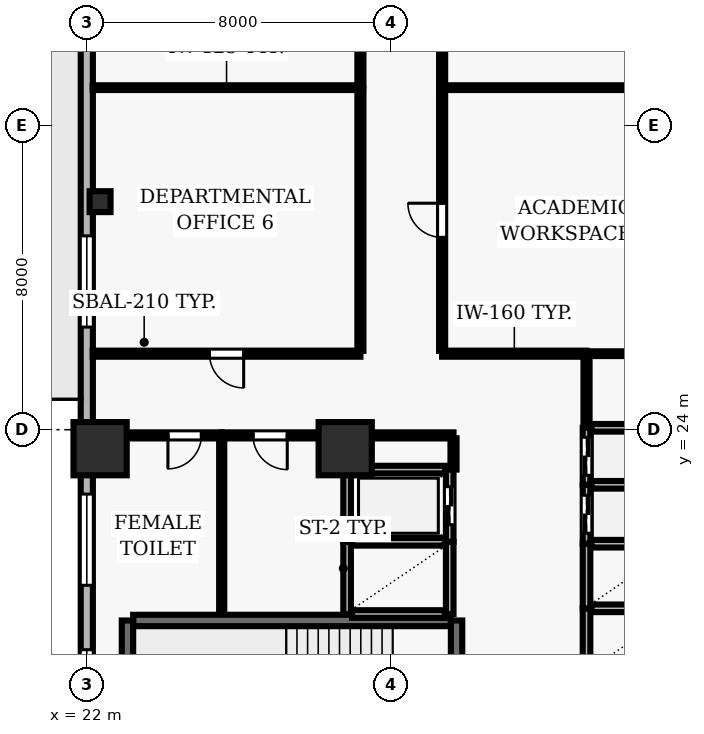
"""IFC4 building model, lengths in metres.
Left out: names, types, materials, properties, quantities, classifications, styles, units other than length and angle.
Written with IfcOpenShell. Run it as: python <this file> out.ifc"""

import sys

from ifc_helpers import new_model, si_unit, direction, frame, frame_2d, origin, origin_2d, place, context, subcontext, project, spatial, rectangle, hollow_rectangle, extrude, element, fill, save


model = new_model("IFC4")
c1 = context("Model", 3, precision=1e-05, world=origin(), true_north=direction((0.0, 1.0)))
c2 = subcontext(c1, "Body", "Model", "MODEL_VIEW")
j1 = project(units=[si_unit("LENGTHUNIT", "METRE"), si_unit("PLANEANGLEUNIT", "RADIAN")], contexts=[c1])
p1 = place(None, origin())
s1 = spatial("IfcSite", under=j1, at=p1, CompositionType="ELEMENT")
p2 = place(p1, origin())
s2 = spatial("IfcBuilding", under=s1, at=p2, CompositionType="ELEMENT")
p3 = place(p2, frame((0.0, 0.0, 46.6)))
s3 = spatial("IfcBuildingStorey", under=s2, at=p3, CompositionType="ELEMENT", Elevation=46.6)
for number, where, z_axis, x_axis in (
    (1, (22.35, 23.5, 0.0), (0.0, 0.0, 1.0), (1.0, 0.0, 0.0)),
    (2, (28.8, 23.5, 0.0), (0.0, 0.0, 1.0), (1.0, 0.0, 0.0)),
):
    element("IfcColumn", number, at=place(p3, frame(where, z_axis=z_axis, x_axis=x_axis)), inside=s3, PredefinedType="COLUMN", context=c2, shape_type="SweptSolid", body=[
        extrude(rectangle(XDim=1.4, YDim=1.4, at=origin_2d()), origin(), (0.0, 0.0, 1.0), 3.9),
    ])
p4 = place(p3, frame((22.35, 30.0, 0.0), z_axis=(0.0, 0.0, 1.0), x_axis=(1.0, 0.0, 0.0)))
e3 = element("IfcColumn", 3, at=p4, inside=s3, PredefinedType="COLUMN", context=c2, shape_type="SweptSolid", body=[
    extrude(hollow_rectangle(XDim=0.55, YDim=0.55, WallThickness=0.025, at=origin_2d()), origin(), (0.0, 0.0, 1.0), 3.9),
])
p5 = place(p3, frame((22.0, 51.5, 0.0), z_axis=(0.0, 0.0, 1.0), x_axis=(0.0, -1.0, 0.0)))
e4 = element("IfcWall", 4, at=p5, inside=s3, PredefinedType="SOLIDWALL", context=c2, shape_type="SweptSolid", body=[
    extrude(rectangle(XDim=49.0, YDim=0.32, at=frame_2d((24.5, 0.0))), origin(), (0.0, 0.0, 1.0), 3.69),
])
p6 = place(p5, frame((12.1, 0.0, 0.0)))
e5 = element("IfcOpeningElement", 5, at=p6, cuts=e4, PredefinedType="OPENING", context=c2, shape_type="SweptSolid", body=[
    extrude(rectangle(XDim=1.0, YDim=2.2, at=frame_2d((0.5, 1.1))), frame((0.0, 0.17, 0.0), z_axis=(0.0, -1.0, 0.0), x_axis=(1.0, 0.0, 0.0)), (0.0, 0.0, 1.0), 0.34),
])
p7 = place(p5, frame((1.522, 0.0, 0.9)))
e6 = element("IfcOpeningElement", 6, at=p7, cuts=e4, PredefinedType="OPENING", context=c2, shape_type="SweptSolid", body=[
    extrude(rectangle(XDim=2.4, YDim=2.2, at=frame_2d((1.2, 1.1))), frame((0.0, 0.17, 0.0), z_axis=(0.0, -1.0, 0.0), x_axis=(1.0, 0.0, 0.0)), (0.0, 0.0, 1.0), 0.34),
])
p8 = place(p5, frame((6.967, 0.0, 0.9)))
e7 = element("IfcOpeningElement", 7, at=p8, cuts=e4, PredefinedType="OPENING", context=c2, shape_type="SweptSolid", body=[
    extrude(rectangle(XDim=2.4, YDim=2.2, at=frame_2d((1.2, 1.1))), frame((0.0, 0.17, 0.0), z_axis=(0.0, -1.0, 0.0), x_axis=(1.0, 0.0, 0.0)), (0.0, 0.0, 1.0), 0.34),
])
p9 = place(p5, frame((22.4, 0.0, 0.9)))
e8 = element("IfcOpeningElement", 8, at=p9, cuts=e4, PredefinedType="OPENING", context=c2, shape_type="SweptSolid", body=[
    extrude(rectangle(XDim=2.4, YDim=2.2, at=frame_2d((1.2, 1.1))), frame((0.0, 0.17, 0.0), z_axis=(0.0, -1.0, 0.0), x_axis=(1.0, 0.0, 0.0)), (0.0, 0.0, 1.0), 0.34),
])
p10 = place(p5, frame((29.194, 0.0, 0.9)))
e9 = element("IfcOpeningElement", 9, at=p10, cuts=e4, PredefinedType="OPENING", context=c2, shape_type="SweptSolid", body=[
    extrude(rectangle(XDim=2.4, YDim=2.2, at=frame_2d((1.2, 1.1))), frame((0.0, 0.17, 0.0), z_axis=(0.0, -1.0, 0.0), x_axis=(1.0, 0.0, 0.0)), (0.0, 0.0, 1.0), 0.34),
])
p11 = place(p5, frame((33.289, 0.0, 0.9)))
e10 = element("IfcOpeningElement", 10, at=p11, cuts=e4, PredefinedType="OPENING", context=c2, shape_type="SweptSolid", body=[
    extrude(rectangle(XDim=2.4, YDim=2.2, at=frame_2d((1.2, 1.1))), frame((0.0, 0.17, 0.0), z_axis=(0.0, -1.0, 0.0), x_axis=(1.0, 0.0, 0.0)), (0.0, 0.0, 1.0), 0.34),
])
p12 = place(p5, frame((39.633, 0.0, 0.9)))
e11 = element("IfcOpeningElement", 11, at=p12, cuts=e4, PredefinedType="OPENING", context=c2, shape_type="SweptSolid", body=[
    extrude(rectangle(XDim=2.4, YDim=2.2, at=frame_2d((1.2, 1.1))), frame((0.0, 0.17, 0.0), z_axis=(0.0, -1.0, 0.0), x_axis=(1.0, 0.0, 0.0)), (0.0, 0.0, 1.0), 0.34),
])
p13 = place(p3, frame((31.58, 18.98, 0.0), z_axis=(0.0, 0.0, 1.0), x_axis=(-1.0, 0.0, 0.0)))
e12 = element("IfcWall", 12, at=p13, inside=s3, PredefinedType="SHEAR", context=c2, shape_type="SweptSolid", body=[
    extrude(rectangle(XDim=8.36, YDim=0.3, at=frame_2d((4.18, 0.0))), origin(), (0.0, 0.0, 1.0), 3.69),
])
p14 = place(p3, frame((23.07, 18.98, 0.0), z_axis=(0.0, 0.0, 1.0), x_axis=(0.0, -1.0, 0.0)))
e13 = element("IfcWall", 13, at=p14, inside=s3, PredefinedType="SHEAR", context=c2, shape_type="SweptSolid", body=[
    extrude(rectangle(XDim=3.51, YDim=0.3, at=frame_2d((1.755, 0.0))), origin(), (0.0, 0.0, 1.0), 3.69),
])
p15 = place(p3, frame((31.73, 15.47, 0.0), z_axis=(0.0, 0.0, 1.0), x_axis=(0.0, 1.0, 0.0)))
e14 = element("IfcWall", 14, at=p15, inside=s3, PredefinedType="SHEAR", context=c2, shape_type="SweptSolid", body=[
    extrude(rectangle(XDim=3.51, YDim=0.3, at=frame_2d((1.755, 0.0))), origin(), (0.0, 0.0, 1.0), 3.69),
])
p16 = place(p15, frame((1.18, 0.0, 0.0)))
e15 = element("IfcOpeningElement", 15, at=p16, cuts=e14, PredefinedType="OPENING", context=c2, shape_type="SweptSolid", body=[
    extrude(rectangle(XDim=1.15, YDim=2.15, at=frame_2d((0.575, 1.075))), frame((0.0, 0.16, 0.0), z_axis=(0.0, -1.0, 0.0), x_axis=(1.0, 0.0, 0.0)), (0.0, 0.0, 1.0), 0.32),
])
p17 = place(p3, frame((35.15, 19.3, 0.0), z_axis=(0.0, 0.0, 1.0), x_axis=(0.0, -1.0, 0.0)))
e16 = element("IfcWall", 16, at=p17, inside=s3, PredefinedType="SOLIDWALL", context=c2, shape_type="SweptSolid", body=[
    extrude(rectangle(XDim=1.7, YDim=0.2, at=frame_2d((0.85, 0.0))), origin(), (0.0, 0.0, 1.0), 3.69),
])
p18 = place(p3, frame((37.42, 19.3, 0.0), z_axis=(0.0, 0.0, 1.0), x_axis=(-1.0, 0.0, 0.0)))
e17 = element("IfcWall", 17, at=p18, inside=s3, PredefinedType="SOLIDWALL", context=c2, shape_type="SweptSolid", body=[
    extrude(rectangle(XDim=2.14, YDim=0.2, at=frame_2d((1.07, 0.0))), origin(), (0.0, 0.0, 1.0), 3.69),
])
p19 = place(p3, frame((35.15, 21.0, 0.0), z_axis=(0.0, 0.0, 1.0), x_axis=(0.0, -1.0, 0.0)))
e18 = element("IfcWall", 18, at=p19, inside=s3, PredefinedType="SOLIDWALL", context=c2, shape_type="SweptSolid", body=[
    extrude(rectangle(XDim=1.7, YDim=0.2, at=frame_2d((0.85, 0.0))), origin(), (0.0, 0.0, 1.0), 3.69),
])
p20 = place(p3, frame((37.42, 21.0, 0.0), z_axis=(0.0, 0.0, 1.0), x_axis=(-1.0, 0.0, 0.0)))
e19 = element("IfcWall", 19, at=p20, inside=s3, PredefinedType="SOLIDWALL", context=c2, shape_type="SweptSolid", body=[
    extrude(rectangle(XDim=2.14, YDim=0.2, at=frame_2d((1.07, 0.0))), origin(), (0.0, 0.0, 1.0), 3.69),
])
for number, where, z_axis, x_axis in (
    (20, (28.85, 21.05, 0.0), (0.0, 0.0, 1.0), (0.0, -1.0, 0.0)),
    (21, (31.55, 19.15, 0.0), (0.0, 0.0, 1.0), (0.0, 1.0, 0.0)),
):
    element("IfcWall", number, at=place(p3, frame(where, z_axis=z_axis, x_axis=x_axis)), inside=s3, PredefinedType="SOLIDWALL", context=c2, shape_type="SweptSolid", body=[
        extrude(rectangle(XDim=1.9, YDim=0.2, at=frame_2d((0.95, 0.0))), origin(), (0.0, 0.0, 1.0), 3.69),
    ])
for number, where, z_axis, x_axis in (
    (22, (28.98, 19.15, 0.0), (0.0, 0.0, 1.0), (1.0, 0.0, 0.0)),
    (23, (31.42, 21.05, 0.0), (0.0, 0.0, 1.0), (-1.0, 0.0, 0.0)),
):
    element("IfcWall", number, at=place(p3, frame(where, z_axis=z_axis, x_axis=x_axis)), inside=s3, PredefinedType="SOLIDWALL", context=c2, shape_type="SweptSolid", body=[
        extrude(rectangle(XDim=2.44, YDim=0.2, at=frame_2d((1.22, 0.0))), origin(), (0.0, 0.0, 1.0), 3.69),
    ])
p21 = place(p3, frame((35.15, 22.55, 0.0), z_axis=(0.0, 0.0, 1.0), x_axis=(0.0, -1.0, 0.0)))
e24 = element("IfcWall", 24, at=p21, inside=s3, PredefinedType="SOLIDWALL", context=c2, shape_type="SweptSolid", body=[
    extrude(rectangle(XDim=1.55, YDim=0.2, at=frame_2d((0.775, 0.0))), origin(), (0.0, 0.0, 1.0), 3.69),
])
p22 = place(p21, frame((0.275, 0.0, 0.0)))
e25 = element("IfcOpeningElement", 25, at=p22, cuts=e24, PredefinedType="OPENING", context=c2, shape_type="SweptSolid", body=[
    extrude(rectangle(XDim=1.0, YDim=2.1, at=frame_2d((0.5, 1.05))), frame((0.0, 0.11, 0.0), z_axis=(0.0, -1.0, 0.0), x_axis=(1.0, 0.0, 0.0)), (0.0, 0.0, 1.0), 0.22),
])
p23 = place(p3, frame((37.42, 22.55, 0.0), z_axis=(0.0, 0.0, 1.0), x_axis=(-1.0, 0.0, 0.0)))
e26 = element("IfcWall", 26, at=p23, inside=s3, PredefinedType="SOLIDWALL", context=c2, shape_type="SweptSolid", body=[
    extrude(rectangle(XDim=2.14, YDim=0.2, at=frame_2d((1.07, 0.0))), origin(), (0.0, 0.0, 1.0), 3.69),
])
p24 = place(p3, frame((35.15, 24.05, 0.0), z_axis=(0.0, 0.0, 1.0), x_axis=(0.0, -1.0, 0.0)))
e27 = element("IfcWall", 27, at=p24, inside=s3, PredefinedType="SOLIDWALL", context=c2, shape_type="SweptSolid", body=[
    extrude(rectangle(XDim=1.5, YDim=0.2, at=frame_2d((0.75, 0.0))), origin(), (0.0, 0.0, 1.0), 3.69),
])
p25 = place(p24, frame((0.25, 0.0, 0.0)))
e28 = element("IfcOpeningElement", 28, at=p25, cuts=e27, PredefinedType="OPENING", context=c2, shape_type="SweptSolid", body=[
    extrude(rectangle(XDim=1.0, YDim=2.1, at=frame_2d((0.5, 1.05))), frame((0.0, 0.11, 0.0), z_axis=(0.0, -1.0, 0.0), x_axis=(1.0, 0.0, 0.0)), (0.0, 0.0, 1.0), 0.22),
])
p26 = place(p3, frame((37.42, 24.05, 0.0), z_axis=(0.0, 0.0, 1.0), x_axis=(-1.0, 0.0, 0.0)))
e29 = element("IfcWall", 29, at=p26, inside=s3, PredefinedType="SOLIDWALL", context=c2, shape_type="SweptSolid", body=[
    extrude(rectangle(XDim=2.14, YDim=0.2, at=frame_2d((1.07, 0.0))), origin(), (0.0, 0.0, 1.0), 3.69),
])
p27 = place(p3, frame((28.85, 22.95, 0.0), z_axis=(0.0, 0.0, 1.0), x_axis=(0.0, -1.0, 0.0)))
e30 = element("IfcWall", 30, at=p27, inside=s3, PredefinedType="SOLIDWALL", context=c2, shape_type="SweptSolid", body=[
    extrude(rectangle(XDim=1.9, YDim=0.2, at=frame_2d((0.95, 0.0))), origin(), (0.0, 0.0, 1.0), 3.69),
])
p28 = place(p3, frame((31.55, 21.05, 0.0), z_axis=(0.0, 0.0, 1.0), x_axis=(0.0, 1.0, 0.0)))
e31 = element("IfcWall", 31, at=p28, inside=s3, PredefinedType="SOLIDWALL", context=c2, shape_type="SweptSolid", body=[
    extrude(rectangle(XDim=1.9, YDim=0.2, at=frame_2d((0.95, 0.0))), origin(), (0.0, 0.0, 1.0), 3.69),
])
p29 = place(p28, frame((0.45, 0.0, 0.0)))
e32 = element("IfcOpeningElement", 32, at=p29, cuts=e31, PredefinedType="OPENING", context=c2, shape_type="SweptSolid", body=[
    extrude(rectangle(XDim=1.0, YDim=2.1, at=frame_2d((0.5, 1.05))), frame((0.0, 0.11, 0.0), z_axis=(0.0, -1.0, 0.0), x_axis=(1.0, 0.0, 0.0)), (0.0, 0.0, 1.0), 0.22),
])
p30 = place(p3, frame((31.43, 22.95, 0.0), z_axis=(0.0, 0.0, 1.0), x_axis=(-1.0, 0.0, 0.0)))
e33 = element("IfcWall", 33, at=p30, inside=s3, PredefinedType="SOLIDWALL", context=c2, shape_type="SweptSolid", body=[
    extrude(rectangle(XDim=2.46, YDim=0.2, at=frame_2d((1.23, 0.0))), origin(), (0.0, 0.0, 1.0), 3.69),
])
p31 = place(p3, frame((25.55, 23.85, 0.0), z_axis=(0.0, 0.0, 1.0), x_axis=(-1.0, 0.0, 0.0)))
e34 = element("IfcWall", 34, at=p31, inside=s3, PredefinedType="PARTITIONING", context=c2, shape_type="SweptSolid", body=[
    extrude(rectangle(XDim=3.35, YDim=0.16, at=frame_2d((1.675, 0.0))), origin(), (0.0, 0.0, 1.0), 2.995),
])
p32 = place(p31, frame((0.535, 0.0, 0.0)))
e35 = element("IfcOpeningElement", 35, at=p32, cuts=e34, PredefinedType="OPENING", context=c2, shape_type="SweptSolid", body=[
    extrude(rectangle(XDim=0.88, YDim=2.1, at=frame_2d((0.44, 1.05))), frame((0.0, 0.09, 0.0), z_axis=(0.0, -1.0, 0.0), x_axis=(1.0, 0.0, 0.0)), (0.0, 0.0, 1.0), 0.18),
])
p33 = place(p3, frame((28.8, 23.85, 0.0), z_axis=(0.0, 0.0, 1.0), x_axis=(-1.0, 0.0, 0.0)))
e36 = element("IfcWall", 36, at=p33, inside=s3, PredefinedType="PARTITIONING", context=c2, shape_type="SweptSolid", body=[
    extrude(rectangle(XDim=3.25, YDim=0.16, at=frame_2d((1.625, 0.0))), origin(), (0.0, 0.0, 1.0), 2.995),
])
p34 = place(p33, frame((1.525, 0.0, 0.0)))
e37 = element("IfcOpeningElement", 37, at=p34, cuts=e36, PredefinedType="OPENING", context=c2, shape_type="SweptSolid", body=[
    extrude(rectangle(XDim=0.9, YDim=2.1, at=frame_2d((0.45, 1.05))), frame((0.0, 0.09, 0.0), z_axis=(0.0, -1.0, 0.0), x_axis=(1.0, 0.0, 0.0)), (0.0, 0.0, 1.0), 0.18),
])
p35 = place(p3, frame((28.8, 23.85, 0.0), z_axis=(0.0, 0.0, 1.0), x_axis=(1.0, 0.0, 0.0)))
e38 = element("IfcWall", 38, at=p35, inside=s3, PredefinedType="PARTITIONING", context=c2, shape_type="SweptSolid", body=[
    extrude(rectangle(XDim=2.85, YDim=0.16, at=frame_2d((1.425, 0.0))), origin(), (0.0, 0.0, 1.0), 3.69),
])
p36 = place(p3, frame((29.2, 26.0, 0.0), z_axis=(0.0, 0.0, 1.0), x_axis=(-1.0, 0.0, 0.0)))
e39 = element("IfcWall", 39, at=p36, inside=s3, PredefinedType="PARTITIONING", context=c2, shape_type="SweptSolid", body=[
    extrude(rectangle(XDim=7.045, YDim=0.16, at=frame_2d((3.522, 0.0))), origin(), (0.0, 0.0, 1.0), 3.69),
])
p37 = place(p36, frame((3.072, 0.0, 0.0)))
e40 = element("IfcOpeningElement", 40, at=p37, cuts=e39, PredefinedType="OPENING", context=c2, shape_type="SweptSolid", body=[
    extrude(rectangle(XDim=0.9, YDim=2.1, at=frame_2d((0.45, 1.05))), frame((0.0, 0.09, 0.0), z_axis=(0.0, -1.0, 0.0), x_axis=(1.0, 0.0, 0.0)), (0.0, 0.0, 1.0), 0.18),
])
p38 = place(p3, frame((29.2, 33.0, 0.0), z_axis=(0.0, 0.0, 1.0), x_axis=(-1.0, 0.0, 0.0)))
e41 = element("IfcWall", 41, at=p38, inside=s3, PredefinedType="PARTITIONING", context=c2, shape_type="SweptSolid", body=[
    extrude(rectangle(XDim=7.045, YDim=0.125, at=frame_2d((3.522, 0.0))), origin(), (0.0, 0.0, 1.0), 3.227),
])
p39 = place(p3, frame((35.15, 26.0, 0.0), z_axis=(0.0, 0.0, 1.0), x_axis=(-1.0, 0.0, 0.0)))
e42 = element("IfcWall", 42, at=p39, inside=s3, PredefinedType="PARTITIONING", context=c2, shape_type="SweptSolid", body=[
    extrude(rectangle(XDim=3.8, YDim=0.16, at=frame_2d((1.9, 0.0))), origin(), (0.0, 0.0, 1.0), 3.69),
])
p40 = place(p3, frame((35.15, 26.0, 0.0), z_axis=(0.0, 0.0, 1.0), x_axis=(1.0, 0.0, 0.0)))
e43 = element("IfcWall", 43, at=p40, inside=s3, PredefinedType="PARTITIONING", context=c2, shape_type="SweptSolid", body=[
    extrude(rectangle(XDim=2.7, YDim=0.125, at=frame_2d((1.35, 0.0))), origin(), (0.0, 0.0, 1.0), 3.69),
])
p41 = place(p3, frame((37.845, 33.0, 0.0), z_axis=(0.0, 0.0, 1.0), x_axis=(-1.0, 0.0, 0.0)))
e44 = element("IfcWall", 44, at=p41, inside=s3, PredefinedType="PARTITIONING", context=c2, shape_type="SweptSolid", body=[
    extrude(rectangle(XDim=6.495, YDim=0.125, at=frame_2d((3.248, 0.0))), origin(), (0.0, 0.0, 1.0), 3.227),
])
p42 = place(p3, frame((25.55, 19.16, 0.0), z_axis=(0.0, 0.0, 1.0), x_axis=(0.0, 1.0, 0.0)))
e45 = element("IfcWall", 45, at=p42, inside=s3, PredefinedType="PARTITIONING", context=c2, shape_type="SweptSolid", body=[
    extrude(rectangle(XDim=4.615, YDim=0.135, at=frame_2d((2.308, 0.0))), origin(), (0.0, 0.0, 1.0), 3.69),
])
p43 = place(p3, frame((28.8, 22.95, 0.0), z_axis=(0.0, 0.0, 1.0), x_axis=(0.0, 1.0, 0.0)))
e46 = element("IfcWall", 46, at=p43, inside=s3, PredefinedType="PARTITIONING", context=c2, shape_type="SweptSolid", body=[
    extrude(rectangle(XDim=0.825, YDim=0.125, at=frame_2d((0.413, 0.0))), origin(), (0.0, 0.0, 1.0), 3.69),
])
p44 = place(p3, frame((29.2, 32.943, 0.0), z_axis=(0.0, 0.0, 1.0), x_axis=(0.0, -1.0, 0.0)))
e47 = element("IfcWall", 47, at=p44, inside=s3, PredefinedType="PARTITIONING", context=c2, shape_type="SweptSolid", body=[
    extrude(rectangle(XDim=6.868, YDim=0.16, at=frame_2d((3.434, 0.0))), origin(), (0.0, 0.0, 1.0), 3.69),
])
p45 = place(p3, frame((29.2, 39.943, 0.0), z_axis=(0.0, 0.0, 1.0), x_axis=(0.0, -1.0, 0.0)))
e48 = element("IfcWall", 48, at=p45, inside=s3, PredefinedType="PARTITIONING", context=c2, shape_type="SweptSolid", body=[
    extrude(rectangle(XDim=6.886, YDim=0.16, at=frame_2d((3.443, 0.0))), origin(), (0.0, 0.0, 1.0), 3.69),
])
p46 = place(p45, frame((2.993, 0.0, 0.0)))
e49 = element("IfcOpeningElement", 49, at=p46, cuts=e48, PredefinedType="OPENING", context=c2, shape_type="SweptSolid", body=[
    extrude(rectangle(XDim=0.9, YDim=2.1, at=frame_2d((0.45, 1.05))), frame((0.0, 0.09, 0.0), z_axis=(0.0, -1.0, 0.0), x_axis=(1.0, 0.0, 0.0)), (0.0, 0.0, 1.0), 0.18),
])
p47 = place(p3, frame((31.35, 26.075, 0.0), z_axis=(0.0, 0.0, 1.0), x_axis=(0.0, 1.0, 0.0)))
e50 = element("IfcWall", 50, at=p47, inside=s3, PredefinedType="PARTITIONING", context=c2, shape_type="SweptSolid", body=[
    extrude(rectangle(XDim=6.868, YDim=0.16, at=frame_2d((3.434, 0.0))), origin(), (0.0, 0.0, 1.0), 3.69),
])
p48 = place(p47, frame((2.984, 0.0, 0.0)))
e51 = element("IfcOpeningElement", 51, at=p48, cuts=e50, PredefinedType="OPENING", context=c2, shape_type="SweptSolid", body=[
    extrude(rectangle(XDim=0.9, YDim=2.1, at=frame_2d((0.45, 1.05))), frame((0.0, 0.09, 0.0), z_axis=(0.0, -1.0, 0.0), x_axis=(1.0, 0.0, 0.0)), (0.0, 0.0, 1.0), 0.18),
])
p49 = place(p3, frame((31.35, 33.057, 0.0), z_axis=(0.0, 0.0, 1.0), x_axis=(0.0, 1.0, 0.0)))
e52 = element("IfcWall", 52, at=p49, inside=s3, PredefinedType="PARTITIONING", context=c2, shape_type="SweptSolid", body=[
    extrude(rectangle(XDim=6.886, YDim=0.16, at=frame_2d((3.443, 0.0))), origin(), (0.0, 0.0, 1.0), 3.69),
])
p50 = place(p49, frame((2.993, 0.0, 0.0)))
e53 = element("IfcOpeningElement", 53, at=p50, cuts=e52, PredefinedType="OPENING", context=c2, shape_type="SweptSolid", body=[
    extrude(rectangle(XDim=0.9, YDim=2.1, at=frame_2d((0.45, 1.05))), frame((0.0, 0.09, 0.0), z_axis=(0.0, -1.0, 0.0), x_axis=(1.0, 0.0, 0.0)), (0.0, 0.0, 1.0), 0.18),
])
p51 = place(p3, frame((31.65, 23.775, 0.0), z_axis=(0.0, 0.0, 1.0), x_axis=(0.0, -1.0, 0.0)))
e54 = element("IfcWall", 54, at=p51, inside=s3, PredefinedType="PARTITIONING", context=c2, shape_type="SweptSolid", body=[
    extrude(rectangle(XDim=0.825, YDim=0.16, at=frame_2d((0.413, 0.0))), origin(), (0.0, 0.0, 1.0), 3.69),
])
p52 = place(p3, frame((35.15, 24.07, 0.0), z_axis=(0.0, 0.0, 1.0), x_axis=(0.0, 1.0, 0.0)))
e55 = element("IfcWall", 55, at=p52, inside=s3, PredefinedType="PARTITIONING", context=c2, shape_type="SweptSolid", body=[
    extrude(rectangle(XDim=1.855, YDim=0.16, at=frame_2d((0.927, 0.0))), origin(), (0.0, 0.0, 1.0), 3.69),
])
p53 = place(p9, origin())
e56 = element("IfcWindow", 56, at=p53, inside=s3, PartitioningType="SINGLE_PANEL", PredefinedType="WINDOW", context=c2, shape_type="SweptSolid", body=[
    extrude(rectangle(XDim=2.4, YDim=2.2, at=frame_2d((1.2, 1.1))), frame((0.0, 0.03, 0.0), z_axis=(0.0, -1.0, 0.0), x_axis=(1.0, 0.0, 0.0)), (0.0, 0.0, 1.0), 0.06),
])
fill(e8, e56)
p54 = place(p10, origin())
e57 = element("IfcWindow", 57, at=p54, inside=s3, PartitioningType="SINGLE_PANEL", PredefinedType="WINDOW", context=c2, shape_type="SweptSolid", body=[
    extrude(rectangle(XDim=2.4, YDim=2.2, at=frame_2d((1.2, 1.1))), frame((0.0, 0.03, 0.0), z_axis=(0.0, -1.0, 0.0), x_axis=(1.0, 0.0, 0.0)), (0.0, 0.0, 1.0), 0.06),
])
fill(e9, e57)
p55 = place(p11, origin())
e58 = element("IfcWindow", 58, at=p55, inside=s3, PartitioningType="SINGLE_PANEL", PredefinedType="WINDOW", context=c2, shape_type="SweptSolid", body=[
    extrude(rectangle(XDim=2.4, YDim=2.2, at=frame_2d((1.2, 1.1))), frame((0.0, 0.03, 0.0), z_axis=(0.0, -1.0, 0.0), x_axis=(1.0, 0.0, 0.0)), (0.0, 0.0, 1.0), 0.06),
])
fill(e10, e58)
p56 = place(p22, origin())
e59 = element("IfcDoor", 59, at=p56, inside=s3, OperationType="DOUBLE_DOOR_SLIDING", PredefinedType="DOOR", context=c2, shape_type="SweptSolid", body=[
    extrude(rectangle(XDim=1.0, YDim=2.1, at=frame_2d((0.5, 1.05))), frame((0.0, 0.025, 0.0), z_axis=(0.0, -1.0, 0.0), x_axis=(1.0, 0.0, 0.0)), (0.0, 0.0, 1.0), 0.05),
])
fill(e25, e59)
p57 = place(p25, origin())
e60 = element("IfcDoor", 60, at=p57, inside=s3, OperationType="DOUBLE_DOOR_SLIDING", PredefinedType="DOOR", context=c2, shape_type="SweptSolid", body=[
    extrude(rectangle(XDim=1.0, YDim=2.1, at=frame_2d((0.5, 1.05))), frame((0.0, 0.025, 0.0), z_axis=(0.0, -1.0, 0.0), x_axis=(1.0, 0.0, 0.0)), (0.0, 0.0, 1.0), 0.05),
])
fill(e28, e60)
p58 = place(p29, origin())
e61 = element("IfcDoor", 61, at=p58, inside=s3, OperationType="DOUBLE_DOOR_SLIDING", PredefinedType="DOOR", context=c2, shape_type="SweptSolid", body=[
    extrude(rectangle(XDim=1.0, YDim=2.1, at=frame_2d((0.5, 1.05))), frame((0.0, 0.025, 0.0), z_axis=(0.0, -1.0, 0.0), x_axis=(1.0, 0.0, 0.0)), (0.0, 0.0, 1.0), 0.05),
])
fill(e32, e61)
p59 = place(p32, origin())
e62 = element("IfcDoor", 62, at=p59, inside=s3, OperationType="SINGLE_SWING_RIGHT", PredefinedType="DOOR", context=c2, shape_type="SweptSolid", body=[
    extrude(rectangle(XDim=0.88, YDim=2.1, at=frame_2d((0.44, 1.05))), frame((0.0, 0.025, 0.0), z_axis=(0.0, -1.0, 0.0), x_axis=(1.0, 0.0, 0.0)), (0.0, 0.0, 1.0), 0.05),
])
fill(e35, e62)
p60 = place(p34, origin())
e63 = element("IfcDoor", 63, at=p60, inside=s3, OperationType="SINGLE_SWING_LEFT", PredefinedType="DOOR", context=c2, shape_type="SweptSolid", body=[
    extrude(rectangle(XDim=0.9, YDim=2.1, at=frame_2d((0.45, 1.05))), frame((0.0, 0.025, 0.0), z_axis=(0.0, -1.0, 0.0), x_axis=(1.0, 0.0, 0.0)), (0.0, 0.0, 1.0), 0.05),
])
fill(e37, e63)
p61 = place(p37, origin())
e64 = element("IfcDoor", 64, at=p61, inside=s3, OperationType="SINGLE_SWING_LEFT", PredefinedType="DOOR", context=c2, shape_type="SweptSolid", body=[
    extrude(rectangle(XDim=0.9, YDim=2.1, at=frame_2d((0.45, 1.05))), frame((0.0, 0.025, 0.0), z_axis=(0.0, -1.0, 0.0), x_axis=(1.0, 0.0, 0.0)), (0.0, 0.0, 1.0), 0.05),
])
fill(e40, e64)
p62 = place(p48, origin())
e65 = element("IfcDoor", 65, at=p62, inside=s3, OperationType="SINGLE_SWING_RIGHT", PredefinedType="DOOR", context=c2, shape_type="SweptSolid", body=[
    extrude(rectangle(XDim=0.9, YDim=2.1, at=frame_2d((0.45, 1.05))), frame((0.0, 0.025, 0.0), z_axis=(0.0, -1.0, 0.0), x_axis=(1.0, 0.0, 0.0)), (0.0, 0.0, 1.0), 0.05),
])
fill(e51, e65)
save(model, sys.argv[1])
